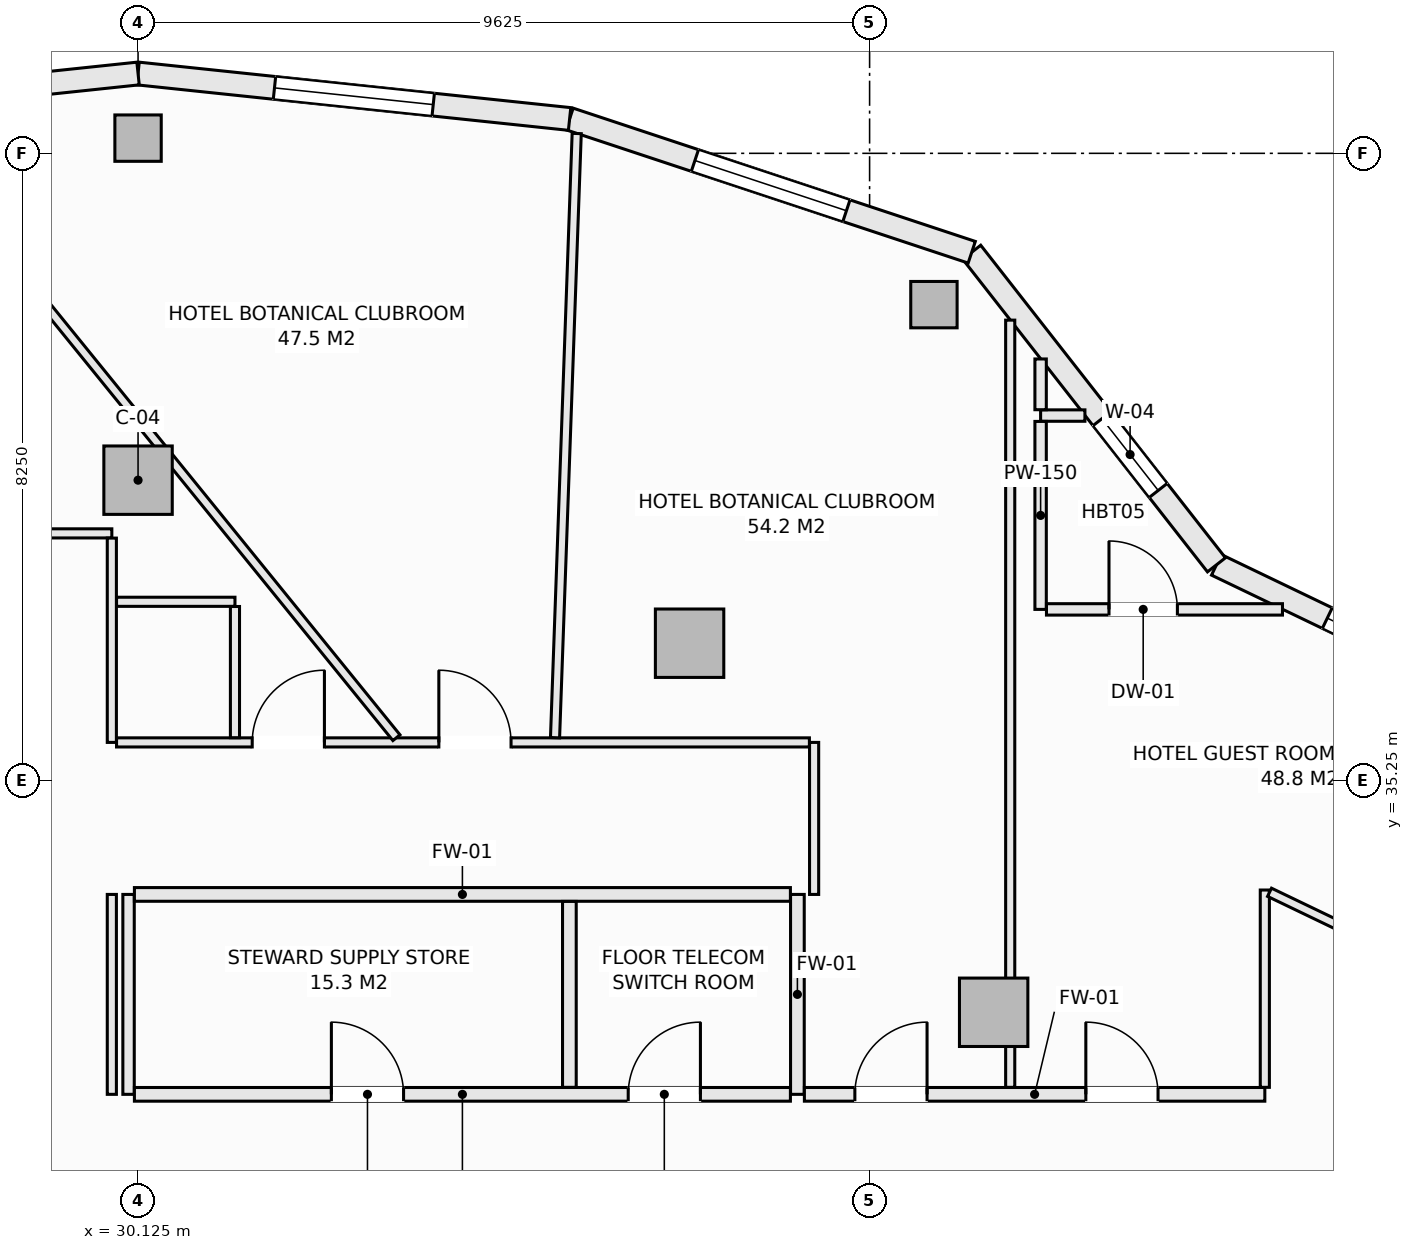
"""IFC4 building model, lengths in metres.
Left out: names, types, materials, properties, quantities, classifications, styles, units other than length and angle.
Written with IfcOpenShell. Run it as: python <this file> out.ifc"""

import sys

from ifc_helpers import new_model, si_unit, direction, frame, frame_2d, origin, origin_2d, place, context, subcontext, project, spatial, rectangle, hollow_rectangle, extrude, element, fill, save


model = new_model("IFC4")
c1 = context("Model", 3, precision=1e-05, world=origin(), true_north=direction((0.0, 1.0)))
c2 = subcontext(c1, "Body", "Model", "MODEL_VIEW")
j1 = project(units=[si_unit("LENGTHUNIT", "METRE"), si_unit("PLANEANGLEUNIT", "RADIAN")], contexts=[c1])
p1 = place(None, origin())
s1 = spatial("IfcSite", under=j1, at=p1, CompositionType="ELEMENT")
p2 = place(p1, origin())
s2 = spatial("IfcBuilding", under=s1, at=p2, CompositionType="ELEMENT")
p3 = place(p2, frame((0.0, 0.0, 180.1)))
s3 = spatial("IfcBuildingStorey", under=s2, at=p3, CompositionType="ELEMENT", Elevation=180.1)
for number, where, z_axis, x_axis in (
    (1, (40.596, 41.51, -0.27), (0.0, 0.0, 1.0), (1.0, 0.0, 0.0)),
    (2, (30.125, 43.7, -0.27), (0.0, 0.0, 1.0), (1.0, 0.0, 0.0)),
):
    element("IfcColumn", number, at=place(p3, frame(where, z_axis=z_axis, x_axis=x_axis)), inside=s3, PredefinedType="COLUMN", context=c2, shape_type="SweptSolid", body=[
        extrude(hollow_rectangle(XDim=0.61, YDim=0.61, WallThickness=0.025, at=origin_2d()), origin(), (0.0, 0.0, 1.0), 3.4),
    ])
for number, where, z_axis, x_axis in (
    (3, (41.382, 32.199, -0.27), (0.0, 0.0, 1.0), (1.0, 0.0, 0.0)),
    (4, (37.382, 37.055, -0.27), (0.0, 0.0, 1.0), (1.0, 0.0, 0.0)),
    (5, (30.125, 39.2, -0.27), (0.0, 0.0, 1.0), (1.0, 0.0, 0.0)),
):
    element("IfcColumn", number, at=place(p3, frame(where, z_axis=z_axis, x_axis=x_axis)), inside=s3, PredefinedType="COLUMN", context=c2, shape_type="SweptSolid", body=[
        extrude(rectangle(XDim=0.9, YDim=0.9, at=origin_2d()), origin(), (0.0, 0.0, 1.0), 3.4),
    ])
p4 = place(p3, frame((44.313, 38.086, 0.0), z_axis=(0.0, 0.0, 1.0), x_axis=(0.901353070301, -0.433085029363, 0.0)))
e6 = element("IfcWall", 6, at=p4, inside=s3, PredefinedType="SOLIDWALL", context=c2, shape_type="SweptSolid", body=[
    extrude(rectangle(XDim=5.336, YDim=0.3, at=frame_2d((2.668, 0.0))), origin(), (0.0, 0.0, 1.0), 2.653),
])
p5 = place(p4, frame((1.618, 0.0, 0.74)))
e7 = element("IfcOpeningElement", 7, at=p5, cuts=e6, PredefinedType="OPENING", context=c2, shape_type="SweptSolid", body=[
    extrude(rectangle(XDim=2.1, YDim=1.7, at=frame_2d((1.05, 0.85))), frame((0.0, 0.16, 0.0), z_axis=(0.0, -1.0, 0.0), x_axis=(1.0, 0.0, 0.0)), (0.0, 0.0, 1.0), 0.32),
])
p6 = place(p3, frame((41.094, 42.199, 0.0), z_axis=(0.0, 0.0, 1.0), x_axis=(0.616429245738, -0.787410302828, 0.0)))
e8 = element("IfcWall", 8, at=p6, inside=s3, PredefinedType="SOLIDWALL", context=c2, shape_type="SweptSolid", body=[
    extrude(rectangle(XDim=5.223, YDim=0.3, at=frame_2d((2.612, 0.0))), origin(), (0.0, 0.0, 1.0), 2.653),
])
p7 = place(p6, frame((2.78, 0.0, 0.72)))
e9 = element("IfcOpeningElement", 9, at=p7, cuts=e8, PredefinedType="OPENING", context=c2, shape_type="SweptSolid", body=[
    extrude(rectangle(XDim=1.2, YDim=1.65, at=frame_2d((0.6, 0.825))), frame((0.0, 0.16, 0.0), z_axis=(0.0, -1.0, 0.0), x_axis=(1.0, 0.0, 0.0)), (0.0, 0.0, 1.0), 0.32),
])
p8 = place(p3, frame((35.803, 43.952, 0.0), z_axis=(0.0, 0.0, 1.0), x_axis=(0.949246811547, -0.314532177636, 0.0)))
e10 = element("IfcWall", 10, at=p8, inside=s3, PredefinedType="SOLIDWALL", context=c2, shape_type="SweptSolid", body=[
    extrude(rectangle(XDim=5.574, YDim=0.3, at=frame_2d((2.787, 0.0))), origin(), (0.0, 0.0, 1.0), 2.653),
])
p9 = place(p8, frame((1.737, 0.0, 0.74)))
e11 = element("IfcOpeningElement", 11, at=p9, cuts=e10, PredefinedType="OPENING", context=c2, shape_type="SweptSolid", body=[
    extrude(rectangle(XDim=2.1, YDim=1.7, at=frame_2d((1.05, 0.85))), frame((0.0, 0.16, 0.0), z_axis=(0.0, -1.0, 0.0), x_axis=(1.0, 0.0, 0.0)), (0.0, 0.0, 1.0), 0.32),
])
p10 = place(p3, frame((30.125, 44.55, 0.0), z_axis=(0.0, 0.0, 1.0), x_axis=(0.994496545245, -0.104769372887, 0.0)))
e12 = element("IfcWall", 12, at=p10, inside=s3, PredefinedType="SOLIDWALL", context=c2, shape_type="SweptSolid", body=[
    extrude(rectangle(XDim=5.709, YDim=0.3, at=frame_2d((2.854, 0.0))), origin(), (0.0, 0.0, 1.0), 2.653),
])
p11 = place(p10, frame((1.805, 0.0, 0.74)))
e13 = element("IfcOpeningElement", 13, at=p11, cuts=e12, PredefinedType="OPENING", context=c2, shape_type="SweptSolid", body=[
    extrude(rectangle(XDim=2.1, YDim=1.7, at=frame_2d((1.05, 0.85))), frame((0.0, 0.16, 0.0), z_axis=(0.0, -1.0, 0.0), x_axis=(1.0, 0.0, 0.0)), (0.0, 0.0, 1.0), 0.32),
])
p12 = place(p3, frame((24.447, 43.952, 0.0), z_axis=(0.0, 0.0, 1.0), x_axis=(0.994496545245, 0.104769372887, 0.0)))
e14 = element("IfcWall", 14, at=p12, inside=s3, PredefinedType="SOLIDWALL", context=c2, shape_type="SweptSolid", body=[
    extrude(rectangle(XDim=5.709, YDim=0.3, at=frame_2d((2.854, 0.0))), origin(), (0.0, 0.0, 1.0), 2.653),
])
p13 = place(p12, frame((2.78, 0.0, 0.72)))
e15 = element("IfcOpeningElement", 15, at=p13, cuts=e14, PredefinedType="OPENING", context=c2, shape_type="SweptSolid", body=[
    extrude(rectangle(XDim=1.2, YDim=1.65, at=frame_2d((0.6, 0.825))), frame((0.0, 0.16, 0.0), z_axis=(0.0, -1.0, 0.0), x_axis=(1.0, 0.0, 0.0)), (0.0, 0.0, 1.0), 0.32),
])
p14 = place(p3, frame((30.0, 31.12, 0.0), z_axis=(0.0, 0.0, 1.0), x_axis=(0.0, 1.0, 0.0)))
e16 = element("IfcWall", 16, at=p14, inside=s3, PredefinedType="PARTITIONING", context=c2, shape_type="SweptSolid", body=[
    extrude(rectangle(XDim=2.63, YDim=0.15, at=frame_2d((1.315, 0.0))), origin(), (0.0, 0.0, 1.0), 3.13),
])
p15 = place(p3, frame((38.8, 31.12, 0.0), z_axis=(0.0, 0.0, 1.0), x_axis=(0.0, 1.0, 0.0)))
e17 = element("IfcWall", 17, at=p15, inside=s3, PredefinedType="SOLIDWALL", context=c2, shape_type="SweptSolid", body=[
    extrude(rectangle(XDim=2.63, YDim=0.18, at=frame_2d((1.315, 0.0))), origin(), (0.0, 0.0, 1.0), 3.13),
])
p16 = place(p3, frame((30.077, 31.12, 0.0), z_axis=(0.0, 0.0, 1.0), x_axis=(1.0, 0.0, 0.0)))
e18 = element("IfcWall", 18, at=p16, inside=s3, PredefinedType="SOLIDWALL", context=c2, shape_type="SweptSolid", body=[
    extrude(rectangle(XDim=8.631, YDim=0.18, at=frame_2d((4.315, 0.0))), origin(), (0.0, 0.0, 1.0), 3.13),
])
p17 = place(p16, frame((2.592, 0.0, 0.0)))
e19 = element("IfcOpeningElement", 19, at=p17, cuts=e18, PredefinedType="OPENING", context=c2, shape_type="SweptSolid", body=[
    extrude(rectangle(XDim=0.95, YDim=2.1, at=frame_2d((0.475, 1.05))), frame((0.0, 0.1, 0.0), z_axis=(0.0, -1.0, 0.0), x_axis=(1.0, 0.0, 0.0)), (0.0, 0.0, 1.0), 0.2),
])
p18 = place(p16, frame((6.497, 0.0, 0.0)))
e20 = element("IfcOpeningElement", 20, at=p18, cuts=e18, PredefinedType="OPENING", context=c2, shape_type="SweptSolid", body=[
    extrude(rectangle(XDim=0.95, YDim=2.1, at=frame_2d((0.475, 1.05))), frame((0.0, 0.1, 0.0), z_axis=(0.0, -1.0, 0.0), x_axis=(1.0, 0.0, 0.0)), (0.0, 0.0, 1.0), 0.2),
])
p19 = place(p3, frame((38.892, 31.12, 0.0), z_axis=(0.0, 0.0, 1.0), x_axis=(1.0, 0.0, 0.0)))
e21 = element("IfcWall", 21, at=p19, inside=s3, PredefinedType="SOLIDWALL", context=c2, shape_type="SweptSolid", body=[
    extrude(rectangle(XDim=6.058, YDim=0.18, at=frame_2d((3.029, 0.0))), origin(), (0.0, 0.0, 1.0), 3.13),
])
p20 = place(p19, frame((3.703, 0.0, 0.0)))
e22 = element("IfcOpeningElement", 22, at=p20, cuts=e21, PredefinedType="OPENING", context=c2, shape_type="SweptSolid", body=[
    extrude(rectangle(XDim=0.95, YDim=2.1, at=frame_2d((0.475, 1.05))), frame((0.0, 0.1, 0.0), z_axis=(0.0, -1.0, 0.0), x_axis=(1.0, 0.0, 0.0)), (0.0, 0.0, 1.0), 0.2),
])
p21 = place(p19, frame((0.664, 0.0, 0.0)))
e23 = element("IfcOpeningElement", 23, at=p21, cuts=e21, PredefinedType="OPENING", context=c2, shape_type="SweptSolid", body=[
    extrude(rectangle(XDim=0.95, YDim=2.1, at=frame_2d((0.475, 1.05))), frame((0.0, 0.1, 0.0), z_axis=(0.0, -1.0, 0.0), x_axis=(1.0, 0.0, 0.0)), (0.0, 0.0, 1.0), 0.2),
])
p22 = place(p3, frame((30.077, 33.75, 0.0), z_axis=(0.0, 0.0, 1.0), x_axis=(1.0, 0.0, 0.0)))
e24 = element("IfcWall", 24, at=p22, inside=s3, PredefinedType="SOLIDWALL", context=c2, shape_type="SweptSolid", body=[
    extrude(rectangle(XDim=8.631, YDim=0.18, at=frame_2d((4.315, 0.0))), origin(), (0.0, 0.0, 1.0), 3.13),
])
p23 = place(p3, frame((35.8, 31.212, 0.0), z_axis=(0.0, 0.0, 1.0), x_axis=(0.0, 1.0, 0.0)))
e25 = element("IfcWall", 25, at=p23, inside=s3, PredefinedType="SOLIDWALL", context=c2, shape_type="SweptSolid", body=[
    extrude(rectangle(XDim=2.446, YDim=0.18, at=frame_2d((1.223, 0.0))), origin(), (0.0, 0.0, 1.0), 3.13),
])
p24 = place(p3, frame((39.02, 33.75, 0.0), z_axis=(0.0, 0.0, 1.0), x_axis=(0.0, 1.0, 0.0)))
e26 = element("IfcWall", 26, at=p24, inside=s3, PredefinedType="PARTITIONING", context=c2, shape_type="SweptSolid", body=[
    extrude(rectangle(XDim=2.0, YDim=0.12, at=frame_2d((1.0, 0.0))), origin(), (0.0, 0.0, 1.0), 3.13),
])
p25 = place(p3, frame((27.25, 38.5, 0.0), z_axis=(0.0, 0.0, 1.0), x_axis=(1.0, 0.0, 0.0)))
e27 = element("IfcWall", 27, at=p25, inside=s3, PredefinedType="PARTITIONING", context=c2, shape_type="SweptSolid", body=[
    extrude(rectangle(XDim=2.53, YDim=0.12, at=frame_2d((1.265, 0.0))), origin(), (0.0, 0.0, 1.0), 3.13),
])
p26 = place(p3, frame((29.78, 31.12, 0.0), z_axis=(0.0, 0.0, 1.0), x_axis=(0.0, 1.0, 0.0)))
e28 = element("IfcWall", 28, at=p26, inside=s3, PredefinedType="PARTITIONING", context=c2, shape_type="SweptSolid", body=[
    extrude(rectangle(XDim=2.63, YDim=0.12, at=frame_2d((1.315, 0.0))), origin(), (0.0, 0.0, 1.0), 3.13),
])
p27 = place(p3, frame((29.78, 35.75, 0.0), z_axis=(0.0, 0.0, 1.0), x_axis=(0.0, 1.0, 0.0)))
e29 = element("IfcWall", 29, at=p27, inside=s3, PredefinedType="PARTITIONING", context=c2, shape_type="SweptSolid", body=[
    extrude(rectangle(XDim=2.688, YDim=0.12, at=frame_2d((1.344, 0.0))), origin(), (0.0, 0.0, 1.0), 3.13),
])
p28 = place(p3, frame((29.842, 35.75, 0.0), z_axis=(0.0, 0.0, 1.0), x_axis=(1.0, 0.0, 0.0)))
e30 = element("IfcWall", 30, at=p28, inside=s3, PredefinedType="PARTITIONING", context=c2, shape_type="SweptSolid", body=[
    extrude(rectangle(XDim=9.116, YDim=0.12, at=frame_2d((4.558, 0.0))), origin(), (0.0, 0.0, 1.0), 2.505),
])
p29 = place(p28, frame((4.24, 0.0, 0.0)))
e31 = element("IfcOpeningElement", 31, at=p29, cuts=e30, PredefinedType="OPENING", context=c2, shape_type="SweptSolid", body=[
    extrude(rectangle(XDim=0.95, YDim=2.1, at=frame_2d((0.475, 1.05))), frame((0.0, 0.07, 0.0), z_axis=(0.0, -1.0, 0.0), x_axis=(1.0, 0.0, 0.0)), (0.0, 0.0, 1.0), 0.14),
])
p30 = place(p28, frame((1.785, 0.0, 0.0)))
e32 = element("IfcOpeningElement", 32, at=p30, cuts=e30, PredefinedType="OPENING", context=c2, shape_type="SweptSolid", body=[
    extrude(rectangle(XDim=0.95, YDim=2.1, at=frame_2d((0.475, 1.05))), frame((0.0, 0.07, 0.0), z_axis=(0.0, -1.0, 0.0), x_axis=(1.0, 0.0, 0.0)), (0.0, 0.0, 1.0), 0.14),
])
p31 = place(p3, frame((44.95, 31.212, 0.0), z_axis=(0.0, 0.0, 1.0), x_axis=(0.0, 1.0, 0.0)))
e33 = element("IfcWall", 33, at=p31, inside=s3, PredefinedType="PARTITIONING", context=c2, shape_type="SweptSolid", body=[
    extrude(rectangle(XDim=2.596, YDim=0.12, at=frame_2d((1.298, 0.0))), origin(), (0.0, 0.0, 1.0), 3.13),
])
p32 = place(p3, frame((45.012, 33.778, 0.0), z_axis=(0.0, 0.0, 1.0), x_axis=(0.901268034538, -0.433261964544, 0.0)))
e34 = element("IfcWall", 34, at=p32, inside=s3, PredefinedType="PARTITIONING", context=c2, shape_type="SweptSolid", body=[
    extrude(rectangle(XDim=1.644, YDim=0.12, at=frame_2d((0.822, 0.0))), origin(), (0.0, 0.0, 1.0), 3.13),
])
p33 = place(p3, frame((29.842, 37.6, 0.0), z_axis=(0.0, 0.0, 1.0), x_axis=(1.0, 0.0, 0.0)))
e35 = element("IfcWall", 35, at=p33, inside=s3, PredefinedType="PARTITIONING", context=c2, shape_type="SweptSolid", body=[
    extrude(rectangle(XDim=1.558, YDim=0.12, at=frame_2d((0.779, 0.0))), origin(), (0.0, 0.0, 1.0), 3.13),
])
p34 = place(p3, frame((31.4, 35.812, 0.0), z_axis=(0.0, 0.0, 1.0), x_axis=(0.0, 1.0, 0.0)))
e36 = element("IfcWall", 36, at=p34, inside=s3, PredefinedType="PARTITIONING", context=c2, shape_type="SweptSolid", body=[
    extrude(rectangle(XDim=1.726, YDim=0.12, at=frame_2d((0.863, 0.0))), origin(), (0.0, 0.0, 1.0), 3.13),
])
p35 = place(p3, frame((41.6, 31.212, 0.0), z_axis=(0.0, 0.0, 1.0), x_axis=(0.0, 1.0, 0.0)))
e37 = element("IfcWall", 37, at=p35, inside=s3, PredefinedType="PARTITIONING", context=c2, shape_type="SweptSolid", body=[
    extrude(rectangle(XDim=10.094, YDim=0.12, at=frame_2d((5.047, 0.0))), origin(), (0.0, 0.0, 1.0), 2.505),
])
p36 = place(p3, frame((42.0, 40.05, 0.0), z_axis=(0.0, 0.0, 1.0), x_axis=(1.0, 0.0, 0.0)))
e38 = element("IfcWall", 38, at=p36, inside=s3, PredefinedType="PARTITIONING", context=c2, shape_type="SweptSolid", body=[
    extrude(rectangle(XDim=0.583, YDim=0.15, at=frame_2d((0.292, 0.0))), origin(), (0.0, 0.0, 1.0), 2.653),
])
p37 = place(p3, frame((42.0, 37.5, 0.0), z_axis=(0.0, 0.0, 1.0), x_axis=(0.0, 1.0, 0.0)))
e39 = element("IfcWall", 39, at=p37, inside=s3, PredefinedType="PARTITIONING", context=c2, shape_type="SweptSolid", body=[
    extrude(rectangle(XDim=2.473, YDim=0.15, at=frame_2d((1.236, 0.0))), origin(), (0.0, 0.0, 1.0), 3.13),
])
p38 = place(p3, frame((42.0, 40.127, 0.0), z_axis=(0.0, 0.0, 1.0), x_axis=(0.0, 1.0, 0.0)))
e40 = element("IfcWall", 40, at=p38, inside=s3, PredefinedType="PARTITIONING", context=c2, shape_type="SweptSolid", body=[
    extrude(rectangle(XDim=0.668, YDim=0.15, at=frame_2d((0.334, 0.0))), origin(), (0.0, 0.0, 1.0), 3.13),
])
p39 = place(p3, frame((42.077, 37.5, 0.0), z_axis=(0.0, 0.0, 1.0), x_axis=(1.0, 0.0, 0.0)))
e41 = element("IfcWall", 41, at=p39, inside=s3, PredefinedType="PARTITIONING", context=c2, shape_type="SweptSolid", body=[
    extrude(rectangle(XDim=3.105, YDim=0.15, at=frame_2d((1.553, 0.0))), origin(), (0.0, 0.0, 1.0), 2.812),
])
p40 = place(p39, frame((0.823, 0.0, 0.0)))
e42 = element("IfcOpeningElement", 42, at=p40, cuts=e41, PredefinedType="OPENING", context=c2, shape_type="SweptSolid", body=[
    extrude(rectangle(XDim=0.9, YDim=2.1, at=frame_2d((0.45, 1.05))), frame((0.0, 0.085, 0.0), z_axis=(0.0, -1.0, 0.0), x_axis=(1.0, 0.0, 0.0)), (0.0, 0.0, 1.0), 0.17),
])
p41 = place(p3, frame((35.611, 35.812, 0.0), z_axis=(0.0, 0.0, 1.0), x_axis=(0.035850277254, 0.999357172197, 0.0)))
e43 = element("IfcWall", 43, at=p41, inside=s3, PredefinedType="PARTITIONING", context=c2, shape_type="SweptSolid", body=[
    extrude(rectangle(XDim=7.954, YDim=0.12, at=frame_2d((3.977, 0.0))), origin(), (0.0, 0.0, 1.0), 3.13),
])
p42 = place(p3, frame((26.839, 44.051, 0.0), z_axis=(0.0, 0.0, 1.0), x_axis=(0.630087458982, -0.77652417479, 0.0)))
e44 = element("IfcWall", 44, at=p42, inside=s3, PredefinedType="PARTITIONING", context=c2, shape_type="SweptSolid", body=[
    extrude(rectangle(XDim=10.61, YDim=0.12, at=frame_2d((5.305, 0.0))), origin(), (0.0, 0.0, 1.0), 2.505),
])
p43 = place(p5, origin())
e45 = element("IfcWindow", 45, at=p43, inside=s3, PartitioningType="SINGLE_PANEL", PredefinedType="WINDOW", context=c2, shape_type="SweptSolid", body=[
    extrude(rectangle(XDim=2.1, YDim=1.7, at=frame_2d((1.05, 0.85))), frame((0.0, 0.03, 0.0), z_axis=(0.0, -1.0, 0.0), x_axis=(1.0, 0.0, 0.0)), (0.0, 0.0, 1.0), 0.06),
])
fill(e7, e45)
p44 = place(p7, origin())
e46 = element("IfcWindow", 46, at=p44, inside=s3, PartitioningType="SINGLE_PANEL", PredefinedType="WINDOW", context=c2, shape_type="SweptSolid", body=[
    extrude(rectangle(XDim=1.2, YDim=1.65, at=frame_2d((0.6, 0.825))), frame((0.0, 0.03, 0.0), z_axis=(0.0, -1.0, 0.0), x_axis=(1.0, 0.0, 0.0)), (0.0, 0.0, 1.0), 0.06),
])
fill(e9, e46)
p45 = place(p9, origin())
e47 = element("IfcWindow", 47, at=p45, inside=s3, PartitioningType="SINGLE_PANEL", PredefinedType="WINDOW", context=c2, shape_type="SweptSolid", body=[
    extrude(rectangle(XDim=2.1, YDim=1.7, at=frame_2d((1.05, 0.85))), frame((0.0, 0.03, 0.0), z_axis=(0.0, -1.0, 0.0), x_axis=(1.0, 0.0, 0.0)), (0.0, 0.0, 1.0), 0.06),
])
fill(e11, e47)
p46 = place(p11, origin())
e48 = element("IfcWindow", 48, at=p46, inside=s3, PartitioningType="SINGLE_PANEL", PredefinedType="WINDOW", context=c2, shape_type="SweptSolid", body=[
    extrude(rectangle(XDim=2.1, YDim=1.7, at=frame_2d((1.05, 0.85))), frame((0.0, 0.03, 0.0), z_axis=(0.0, -1.0, 0.0), x_axis=(1.0, 0.0, 0.0)), (0.0, 0.0, 1.0), 0.06),
])
fill(e13, e48)
p47 = place(p17, origin())
e49 = element("IfcDoor", 49, at=p47, inside=s3, OperationType="SINGLE_SWING_LEFT", PredefinedType="DOOR", context=c2, shape_type="SweptSolid", body=[
    extrude(rectangle(XDim=0.95, YDim=2.1, at=frame_2d((0.475, 1.05))), frame((0.0, 0.025, 0.0), z_axis=(0.0, -1.0, 0.0), x_axis=(1.0, 0.0, 0.0)), (0.0, 0.0, 1.0), 0.05),
])
fill(e19, e49)
p48 = place(p18, origin())
e50 = element("IfcDoor", 50, at=p48, inside=s3, OperationType="SINGLE_SWING_RIGHT", PredefinedType="DOOR", context=c2, shape_type="SweptSolid", body=[
    extrude(rectangle(XDim=0.95, YDim=2.1, at=frame_2d((0.475, 1.05))), frame((0.0, 0.025, 0.0), z_axis=(0.0, -1.0, 0.0), x_axis=(1.0, 0.0, 0.0)), (0.0, 0.0, 1.0), 0.05),
])
fill(e20, e50)
p49 = place(p20, origin())
e51 = element("IfcDoor", 51, at=p49, inside=s3, OperationType="SINGLE_SWING_LEFT", PredefinedType="DOOR", context=c2, shape_type="SweptSolid", body=[
    extrude(rectangle(XDim=0.95, YDim=2.1, at=frame_2d((0.475, 1.05))), frame((0.0, 0.025, 0.0), z_axis=(0.0, -1.0, 0.0), x_axis=(1.0, 0.0, 0.0)), (0.0, 0.0, 1.0), 0.05),
])
fill(e22, e51)
p50 = place(p21, origin())
e52 = element("IfcDoor", 52, at=p50, inside=s3, OperationType="SINGLE_SWING_RIGHT", PredefinedType="DOOR", context=c2, shape_type="SweptSolid", body=[
    extrude(rectangle(XDim=0.95, YDim=2.1, at=frame_2d((0.475, 1.05))), frame((0.0, 0.025, 0.0), z_axis=(0.0, -1.0, 0.0), x_axis=(1.0, 0.0, 0.0)), (0.0, 0.0, 1.0), 0.05),
])
fill(e23, e52)
p51 = place(p29, origin())
e53 = element("IfcDoor", 53, at=p51, inside=s3, OperationType="SINGLE_SWING_LEFT", PredefinedType="DOOR", context=c2, shape_type="SweptSolid", body=[
    extrude(rectangle(XDim=0.95, YDim=2.1, at=frame_2d((0.475, 1.05))), frame((0.0, 0.025, 0.0), z_axis=(0.0, -1.0, 0.0), x_axis=(1.0, 0.0, 0.0)), (0.0, 0.0, 1.0), 0.05),
])
fill(e31, e53)
p52 = place(p30, origin())
e54 = element("IfcDoor", 54, at=p52, inside=s3, OperationType="SINGLE_SWING_RIGHT", PredefinedType="DOOR", context=c2, shape_type="SweptSolid", body=[
    extrude(rectangle(XDim=0.95, YDim=2.1, at=frame_2d((0.475, 1.05))), frame((0.0, 0.025, 0.0), z_axis=(0.0, -1.0, 0.0), x_axis=(1.0, 0.0, 0.0)), (0.0, 0.0, 1.0), 0.05),
])
fill(e32, e54)
p53 = place(p40, origin())
e55 = element("IfcDoor", 55, at=p53, inside=s3, OperationType="SINGLE_SWING_LEFT", PredefinedType="DOOR", context=c2, shape_type="SweptSolid", body=[
    extrude(rectangle(XDim=0.9, YDim=2.1, at=frame_2d((0.45, 1.05))), frame((0.0, 0.025, 0.0), z_axis=(0.0, -1.0, 0.0), x_axis=(1.0, 0.0, 0.0)), (0.0, 0.0, 1.0), 0.05),
])
fill(e42, e55)
save(model, sys.argv[1])
